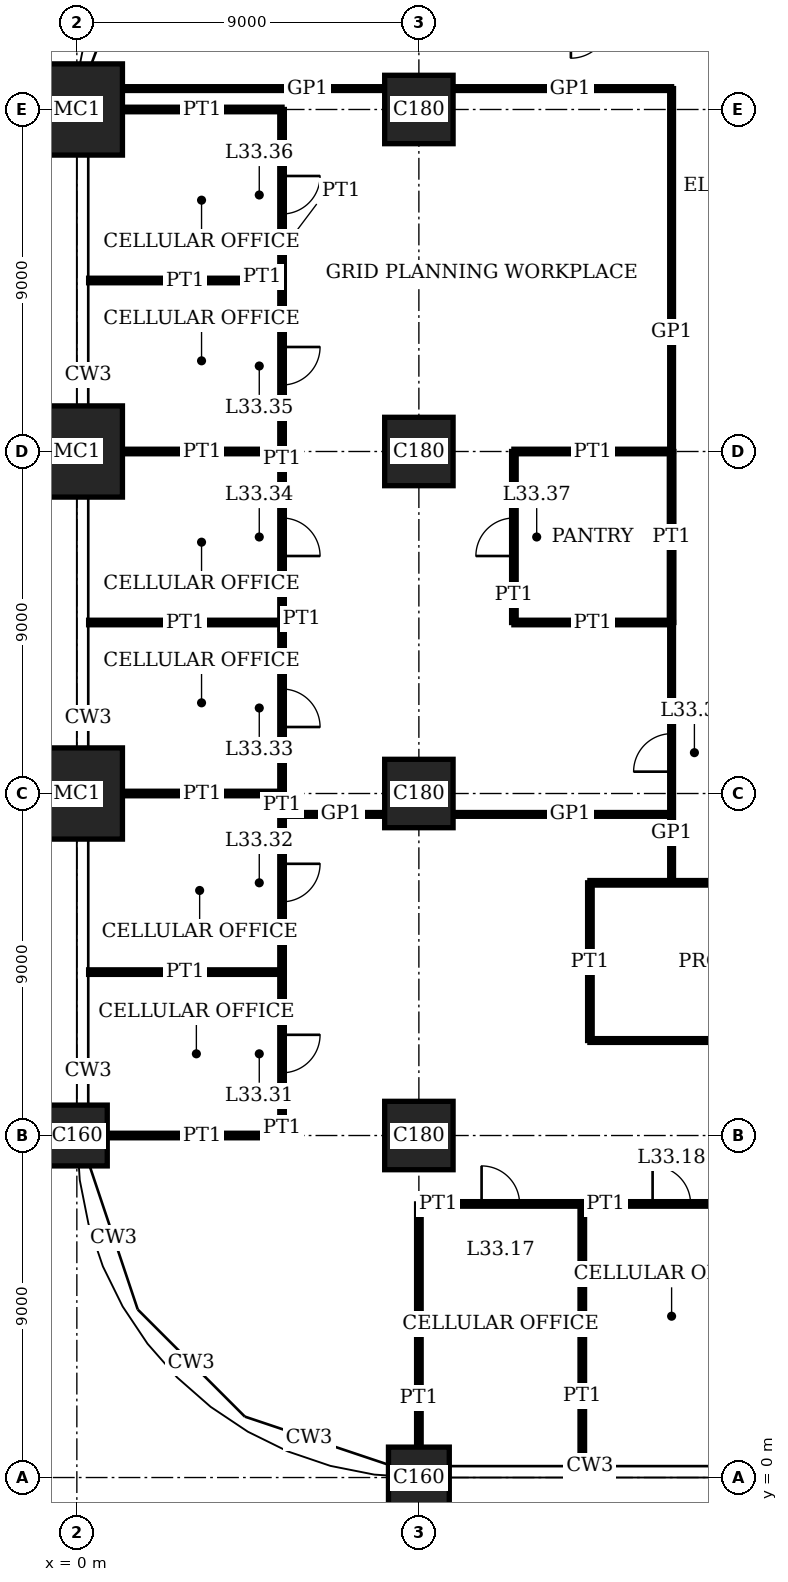
"""IFC4 building model, lengths in metres.
Left out: names, types, materials, properties, quantities, classifications, styles, units other than length and angle.
Written with IfcOpenShell. Run it as: python <this file> out.ifc"""

import sys

from ifc_helpers import new_model, si_unit, direction, frame, frame_2d, origin, origin_2d, place, context, subcontext, project, spatial, rectangle, extrude, element, fill, save


model = new_model("IFC4")
c1 = context("Model", 3, precision=1e-05, world=origin(), true_north=direction((0.0, 1.0)))
c2 = subcontext(c1, "Body", "Model", "MODEL_VIEW")
j1 = project(units=[si_unit("LENGTHUNIT", "METRE"), si_unit("PLANEANGLEUNIT", "RADIAN")], contexts=[c1])
p1 = place(None, origin())
s1 = spatial("IfcSite", under=j1, at=p1, CompositionType="ELEMENT")
p2 = place(p1, origin())
s2 = spatial("IfcBuilding", under=s1, at=p2, CompositionType="ELEMENT")
p3 = place(p2, frame((0.0, 0.0, 137.0)))
s3 = spatial("IfcBuildingStorey", under=s2, at=p3, CompositionType="ELEMENT", Elevation=137.0)
p4 = place(p3, frame((0.0, 9.0, 0.0), z_axis=(0.0, 0.0, 1.0), x_axis=(1.0, 0.0, 0.0)))
e1 = element("IfcColumn", 1, at=p4, inside=s3, PredefinedType="COLUMN", context=c2, shape_type="SweptSolid", body=[
    extrude(rectangle(XDim=1.6, YDim=1.6, at=origin_2d()), origin(), (0.0, 0.0, 1.0), 4.0),
])
for number, where, z_axis, x_axis in (
    (2, (0.0, 18.0, 0.0), (0.0, 0.0, 1.0), (1.0, 0.0, 0.0)),
    (3, (0.0, 27.0, 0.0), (0.0, 0.0, 1.0), (1.0, 0.0, 0.0)),
    (4, (0.0, 36.0, 0.0), (0.0, 0.0, 1.0), (1.0, 0.0, 0.0)),
):
    element("IfcColumn", number, at=place(p3, frame(where, z_axis=z_axis, x_axis=x_axis)), inside=s3, PredefinedType="COLUMN", context=c2, shape_type="SweptSolid", body=[
        extrude(rectangle(XDim=2.4, YDim=2.4, at=origin_2d()), origin(), (0.0, 0.0, 1.0), 4.0),
    ])
p5 = place(p3, frame((9.0, 0.0, 0.0), z_axis=(0.0, 0.0, 1.0), x_axis=(1.0, 0.0, 0.0)))
e5 = element("IfcColumn", 5, at=p5, inside=s3, PredefinedType="COLUMN", context=c2, shape_type="SweptSolid", body=[
    extrude(rectangle(XDim=1.6, YDim=1.6, at=origin_2d()), origin(), (0.0, 0.0, 1.0), 4.0),
])
for number, where, z_axis, x_axis in (
    (6, (9.0, 9.0, 0.0), (0.0, 0.0, 1.0), (1.0, 0.0, 0.0)),
    (7, (9.0, 18.0, 0.0), (0.0, 0.0, 1.0), (1.0, 0.0, 0.0)),
    (8, (9.0, 27.0, 0.0), (0.0, 0.0, 1.0), (1.0, 0.0, 0.0)),
    (9, (9.0, 36.0, 0.0), (0.0, 0.0, 1.0), (1.0, 0.0, 0.0)),
):
    element("IfcColumn", number, at=place(p3, frame(where, z_axis=z_axis, x_axis=x_axis)), inside=s3, PredefinedType="COLUMN", context=c2, shape_type="SweptSolid", body=[
        extrude(rectangle(XDim=1.8, YDim=1.8, at=origin_2d()), origin(), (0.0, 0.0, 1.0), 4.0),
    ])
p6 = place(p3, frame((9.0, 7.2, 0.0), z_axis=(0.0, 0.0, 1.0), x_axis=(1.0, 0.0, 0.0)))
e10 = element("IfcWall", 10, at=p6, inside=s3, PredefinedType="PARTITIONING", context=c2, shape_type="SweptSolid", body=[
    extrude(rectangle(XDim=4.3, YDim=0.12, at=frame_2d((2.15, 0.0))), origin(), (0.0, 0.0, 1.0), 3.75),
])
p7 = place(p6, frame((1.65, 0.0, 0.0)))
e11 = element("IfcOpeningElement", 11, at=p7, cuts=e10, PredefinedType="OPENING", context=c2, shape_type="SweptSolid", body=[
    extrude(rectangle(XDim=1.0, YDim=2.4, at=frame_2d((0.5, 1.2))), frame((0.0, 0.07, 0.0), z_axis=(0.0, -1.0, 0.0), x_axis=(1.0, 0.0, 0.0)), (0.0, 0.0, 1.0), 0.14),
])
p8 = place(p3, frame((13.3, 7.2, 0.0), z_axis=(0.0, 0.0, 1.0), x_axis=(1.0, 0.0, 0.0)))
e12 = element("IfcWall", 12, at=p8, inside=s3, PredefinedType="PARTITIONING", context=c2, shape_type="SweptSolid", body=[
    extrude(rectangle(XDim=4.7, YDim=0.12, at=frame_2d((2.35, 0.0))), origin(), (0.0, 0.0, 1.0), 3.75),
])
p9 = place(p8, frame((1.85, 0.0, 0.0)))
e13 = element("IfcOpeningElement", 13, at=p9, cuts=e12, PredefinedType="OPENING", context=c2, shape_type="SweptSolid", body=[
    extrude(rectangle(XDim=1.0, YDim=2.4, at=frame_2d((0.5, 1.2))), frame((0.0, 0.07, 0.0), z_axis=(0.0, -1.0, 0.0), x_axis=(1.0, 0.0, 0.0)), (0.0, 0.0, 1.0), 0.14),
])
p10 = place(p3, frame((0.8, 9.0, 0.0), z_axis=(0.0, 0.0, 1.0), x_axis=(1.0, 0.0, 0.0)))
e14 = element("IfcWall", 14, at=p10, inside=s3, PredefinedType="PARTITIONING", context=c2, shape_type="SweptSolid", body=[
    extrude(rectangle(XDim=4.6, YDim=0.12, at=frame_2d((2.3, 0.0))), origin(), (0.0, 0.0, 1.0), 3.05),
])
p11 = place(p3, frame((13.5, 11.5, 0.0), z_axis=(0.0, 0.0, 1.0), x_axis=(1.0, 0.0, 0.0)))
e15 = element("IfcWall", 15, at=p11, inside=s3, PredefinedType="PARTITIONING", context=c2, shape_type="SweptSolid", body=[
    extrude(rectangle(XDim=9.0, YDim=0.1, at=frame_2d((4.5, 0.0))), origin(), (0.0, 0.0, 1.0), 3.75),
])
p12 = place(p11, frame((4.0, 0.0, 0.0)))
e16 = element("IfcOpeningElement", 16, at=p12, cuts=e15, PredefinedType="OPENING", context=c2, shape_type="SweptSolid", body=[
    extrude(rectangle(XDim=1.0, YDim=2.4, at=frame_2d((0.5, 1.2))), frame((0.0, 0.06, 0.0), z_axis=(0.0, -1.0, 0.0), x_axis=(1.0, 0.0, 0.0)), (0.0, 0.0, 1.0), 0.12),
])
p13 = place(p3, frame((0.31, 13.3, 0.0), z_axis=(0.0, 0.0, 1.0), x_axis=(1.0, 0.0, 0.0)))
e17 = element("IfcWall", 17, at=p13, inside=s3, PredefinedType="PARTITIONING", context=c2, shape_type="SweptSolid", body=[
    extrude(rectangle(XDim=5.09, YDim=0.12, at=frame_2d((2.545, 0.0))), origin(), (0.0, 0.0, 1.0), 3.1),
])
p14 = place(p3, frame((13.5, 15.65, 0.0), z_axis=(0.0, 0.0, 1.0), x_axis=(1.0, 0.0, 0.0)))
e18 = element("IfcWall", 18, at=p14, inside=s3, PredefinedType="PARTITIONING", context=c2, shape_type="SweptSolid", body=[
    extrude(rectangle(XDim=9.0, YDim=0.12, at=frame_2d((4.5, 0.0))), origin(), (0.0, 0.0, 1.0), 3.75),
])
p15 = place(p3, frame((5.39, 17.45, 0.0), z_axis=(0.0, 0.0, 1.0), x_axis=(1.0, 0.0, 0.0)))
e19 = element("IfcWall", 19, at=p15, inside=s3, PredefinedType="PARTITIONING", context=c2, shape_type="SweptSolid", body=[
    extrude(rectangle(XDim=2.71, YDim=0.1, at=frame_2d((1.355, 0.0))), origin(), (0.0, 0.0, 1.0), 3.75),
])
p16 = place(p3, frame((9.9, 17.45, 0.0), z_axis=(0.0, 0.0, 1.0), x_axis=(1.0, 0.0, 0.0)))
e20 = element("IfcWall", 20, at=p16, inside=s3, PredefinedType="PARTITIONING", context=c2, shape_type="SweptSolid", body=[
    extrude(rectangle(XDim=5.75, YDim=0.1, at=frame_2d((2.875, 0.0))), origin(), (0.0, 0.0, 1.0), 3.75),
])
p17 = place(p3, frame((1.2, 18.0, 0.0), z_axis=(0.0, 0.0, 1.0), x_axis=(1.0, 0.0, 0.0)))
e21 = element("IfcWall", 21, at=p17, inside=s3, PredefinedType="PARTITIONING", context=c2, shape_type="SweptSolid", body=[
    extrude(rectangle(XDim=4.2, YDim=0.12, at=frame_2d((2.1, 0.0))), origin(), (0.0, 0.0, 1.0), 3.05),
])
p18 = place(p3, frame((0.31, 22.5, 0.0), z_axis=(0.0, 0.0, 1.0), x_axis=(1.0, 0.0, 0.0)))
e22 = element("IfcWall", 22, at=p18, inside=s3, PredefinedType="PARTITIONING", context=c2, shape_type="SweptSolid", body=[
    extrude(rectangle(XDim=5.09, YDim=0.12, at=frame_2d((2.545, 0.0))), origin(), (0.0, 0.0, 1.0), 3.1),
])
p19 = place(p3, frame((11.5, 22.5, 0.0), z_axis=(0.0, 0.0, 1.0), x_axis=(1.0, 0.0, 0.0)))
e23 = element("IfcWall", 23, at=p19, inside=s3, PredefinedType="PARTITIONING", context=c2, shape_type="SweptSolid", body=[
    extrude(rectangle(XDim=4.15, YDim=0.12, at=frame_2d((2.075, 0.0))), origin(), (0.0, 0.0, 1.0), 3.1),
])
p20 = place(p3, frame((1.2, 27.0, 0.0), z_axis=(0.0, 0.0, 1.0), x_axis=(1.0, 0.0, 0.0)))
e24 = element("IfcWall", 24, at=p20, inside=s3, PredefinedType="PARTITIONING", context=c2, shape_type="SweptSolid", body=[
    extrude(rectangle(XDim=4.2, YDim=0.12, at=frame_2d((2.1, 0.0))), origin(), (0.0, 0.0, 1.0), 3.05),
])
p21 = place(p3, frame((11.5, 27.0, 0.0), z_axis=(0.0, 0.0, 1.0), x_axis=(1.0, 0.0, 0.0)))
e25 = element("IfcWall", 25, at=p21, inside=s3, PredefinedType="PARTITIONING", context=c2, shape_type="SweptSolid", body=[
    extrude(rectangle(XDim=4.15, YDim=0.12, at=frame_2d((2.075, 0.0))), origin(), (0.0, 0.0, 1.0), 3.05),
])
p22 = place(p3, frame((0.31, 31.5, 0.0), z_axis=(0.0, 0.0, 1.0), x_axis=(1.0, 0.0, 0.0)))
e26 = element("IfcWall", 26, at=p22, inside=s3, PredefinedType="PARTITIONING", context=c2, shape_type="SweptSolid", body=[
    extrude(rectangle(XDim=5.09, YDim=0.12, at=frame_2d((2.545, 0.0))), origin(), (0.0, 0.0, 1.0), 3.1),
])
p23 = place(p3, frame((1.2, 36.0, 0.0), z_axis=(0.0, 0.0, 1.0), x_axis=(1.0, 0.0, 0.0)))
e27 = element("IfcWall", 27, at=p23, inside=s3, PredefinedType="PARTITIONING", context=c2, shape_type="SweptSolid", body=[
    extrude(rectangle(XDim=4.2, YDim=0.12, at=frame_2d((2.1, 0.0))), origin(), (0.0, 0.0, 1.0), 3.05),
])
p24 = place(p3, frame((1.2, 36.55, 0.0), z_axis=(0.0, 0.0, 1.0), x_axis=(1.0, 0.0, 0.0)))
e28 = element("IfcWall", 28, at=p24, inside=s3, PredefinedType="PARTITIONING", context=c2, shape_type="SweptSolid", body=[
    extrude(rectangle(XDim=6.9, YDim=0.1, at=frame_2d((3.45, 0.0))), origin(), (0.0, 0.0, 1.0), 3.75),
])
p25 = place(p3, frame((9.9, 36.55, 0.0), z_axis=(0.0, 0.0, 1.0), x_axis=(1.0, 0.0, 0.0)))
e29 = element("IfcWall", 29, at=p25, inside=s3, PredefinedType="PARTITIONING", context=c2, shape_type="SweptSolid", body=[
    extrude(rectangle(XDim=5.75, YDim=0.1, at=frame_2d((2.875, 0.0))), origin(), (0.0, 0.0, 1.0), 3.75),
])
p26 = place(p3, frame((5.4, 9.0, 0.0), z_axis=(0.0, 0.0, 1.0), x_axis=(0.0, 1.0, 0.0)))
e30 = element("IfcWall", 30, at=p26, inside=s3, PredefinedType="PARTITIONING", context=c2, shape_type="SweptSolid", body=[
    extrude(rectangle(XDim=4.3, YDim=0.12, at=frame_2d((2.15, 0.0))), origin(), (0.0, 0.0, 1.0), 3.75),
])
p27 = place(p26, frame((1.65, 0.0, 0.0)))
e31 = element("IfcOpeningElement", 31, at=p27, cuts=e30, PredefinedType="OPENING", context=c2, shape_type="SweptSolid", body=[
    extrude(rectangle(XDim=1.0, YDim=2.4, at=frame_2d((0.5, 1.2))), frame((0.0, 0.07, 0.0), z_axis=(0.0, -1.0, 0.0), x_axis=(1.0, 0.0, 0.0)), (0.0, 0.0, 1.0), 0.14),
])
p28 = place(p3, frame((5.4, 13.3, 0.0), z_axis=(0.0, 0.0, 1.0), x_axis=(0.0, 1.0, 0.0)))
e32 = element("IfcWall", 32, at=p28, inside=s3, PredefinedType="PARTITIONING", context=c2, shape_type="SweptSolid", body=[
    extrude(rectangle(XDim=4.7, YDim=0.12, at=frame_2d((2.35, 0.0))), origin(), (0.0, 0.0, 1.0), 3.75),
])
p29 = place(p28, frame((1.85, 0.0, 0.0)))
e33 = element("IfcOpeningElement", 33, at=p29, cuts=e32, PredefinedType="OPENING", context=c2, shape_type="SweptSolid", body=[
    extrude(rectangle(XDim=1.0, YDim=2.4, at=frame_2d((0.5, 1.2))), frame((0.0, 0.07, 0.0), z_axis=(0.0, -1.0, 0.0), x_axis=(1.0, 0.0, 0.0)), (0.0, 0.0, 1.0), 0.14),
])
p30 = place(p3, frame((5.4, 18.0, 0.0), z_axis=(0.0, 0.0, 1.0), x_axis=(0.0, 1.0, 0.0)))
e34 = element("IfcWall", 34, at=p30, inside=s3, PredefinedType="PARTITIONING", context=c2, shape_type="SweptSolid", body=[
    extrude(rectangle(XDim=4.5, YDim=0.12, at=frame_2d((2.25, 0.0))), origin(), (0.0, 0.0, 1.0), 3.75),
])
p31 = place(p30, frame((1.75, 0.0, 0.0)))
e35 = element("IfcOpeningElement", 35, at=p31, cuts=e34, PredefinedType="OPENING", context=c2, shape_type="SweptSolid", body=[
    extrude(rectangle(XDim=1.0, YDim=2.4, at=frame_2d((0.5, 1.2))), frame((0.0, 0.07, 0.0), z_axis=(0.0, -1.0, 0.0), x_axis=(1.0, 0.0, 0.0)), (0.0, 0.0, 1.0), 0.14),
])
p32 = place(p3, frame((5.4, 22.5, 0.0), z_axis=(0.0, 0.0, 1.0), x_axis=(0.0, 1.0, 0.0)))
e36 = element("IfcWall", 36, at=p32, inside=s3, PredefinedType="PARTITIONING", context=c2, shape_type="SweptSolid", body=[
    extrude(rectangle(XDim=4.5, YDim=0.12, at=frame_2d((2.25, 0.0))), origin(), (0.0, 0.0, 1.0), 3.75),
])
p33 = place(p32, frame((1.75, 0.0, 0.0)))
e37 = element("IfcOpeningElement", 37, at=p33, cuts=e36, PredefinedType="OPENING", context=c2, shape_type="SweptSolid", body=[
    extrude(rectangle(XDim=1.0, YDim=2.4, at=frame_2d((0.5, 1.2))), frame((0.0, 0.07, 0.0), z_axis=(0.0, -1.0, 0.0), x_axis=(1.0, 0.0, 0.0)), (0.0, 0.0, 1.0), 0.14),
])
p34 = place(p3, frame((5.4, 27.0, 0.0), z_axis=(0.0, 0.0, 1.0), x_axis=(0.0, 1.0, 0.0)))
e38 = element("IfcWall", 38, at=p34, inside=s3, PredefinedType="PARTITIONING", context=c2, shape_type="SweptSolid", body=[
    extrude(rectangle(XDim=4.5, YDim=0.12, at=frame_2d((2.25, 0.0))), origin(), (0.0, 0.0, 1.0), 3.75),
])
p35 = place(p34, frame((1.75, 0.0, 0.0)))
e39 = element("IfcOpeningElement", 39, at=p35, cuts=e38, PredefinedType="OPENING", context=c2, shape_type="SweptSolid", body=[
    extrude(rectangle(XDim=1.0, YDim=2.4, at=frame_2d((0.5, 1.2))), frame((0.0, 0.07, 0.0), z_axis=(0.0, -1.0, 0.0), x_axis=(1.0, 0.0, 0.0)), (0.0, 0.0, 1.0), 0.14),
])
p36 = place(p3, frame((5.4, 31.5, 0.0), z_axis=(0.0, 0.0, 1.0), x_axis=(0.0, 1.0, 0.0)))
e40 = element("IfcWall", 40, at=p36, inside=s3, PredefinedType="PARTITIONING", context=c2, shape_type="SweptSolid", body=[
    extrude(rectangle(XDim=4.5, YDim=0.12, at=frame_2d((2.25, 0.0))), origin(), (0.0, 0.0, 1.0), 3.75),
])
p37 = place(p36, frame((1.75, 0.0, 0.0)))
e41 = element("IfcOpeningElement", 41, at=p37, cuts=e40, PredefinedType="OPENING", context=c2, shape_type="SweptSolid", body=[
    extrude(rectangle(XDim=1.0, YDim=2.4, at=frame_2d((0.5, 1.2))), frame((0.0, 0.07, 0.0), z_axis=(0.0, -1.0, 0.0), x_axis=(1.0, 0.0, 0.0)), (0.0, 0.0, 1.0), 0.14),
])
p38 = place(p3, frame((9.0, 0.8, 0.0), z_axis=(0.0, 0.0, 1.0), x_axis=(0.0, 1.0, 0.0)))
e42 = element("IfcWall", 42, at=p38, inside=s3, PredefinedType="PARTITIONING", context=c2, shape_type="SweptSolid", body=[
    extrude(rectangle(XDim=6.4, YDim=0.12, at=frame_2d((3.2, 0.0))), origin(), (0.0, 0.0, 1.0), 3.05),
])
p39 = place(p3, frame((11.5, 22.5, 0.0), z_axis=(0.0, 0.0, 1.0), x_axis=(0.0, 1.0, 0.0)))
e43 = element("IfcWall", 43, at=p39, inside=s3, PredefinedType="PARTITIONING", context=c2, shape_type="SweptSolid", body=[
    extrude(rectangle(XDim=4.5, YDim=0.12, at=frame_2d((2.25, 0.0))), origin(), (0.0, 0.0, 1.0), 3.75),
])
p40 = place(p39, frame((1.75, 0.0, 0.0)))
e44 = element("IfcOpeningElement", 44, at=p40, cuts=e43, PredefinedType="OPENING", context=c2, shape_type="SweptSolid", body=[
    extrude(rectangle(XDim=1.0, YDim=2.4, at=frame_2d((0.5, 1.2))), frame((0.0, 0.07, 0.0), z_axis=(0.0, -1.0, 0.0), x_axis=(1.0, 0.0, 0.0)), (0.0, 0.0, 1.0), 0.14),
])
p41 = place(p3, frame((13.3, 0.31, 0.0), z_axis=(0.0, 0.0, 1.0), x_axis=(0.0, 1.0, 0.0)))
e45 = element("IfcWall", 45, at=p41, inside=s3, PredefinedType="PARTITIONING", context=c2, shape_type="SweptSolid", body=[
    extrude(rectangle(XDim=6.89, YDim=0.12, at=frame_2d((3.445, 0.0))), origin(), (0.0, 0.0, 1.0), 3.75),
])
p42 = place(p3, frame((13.5, 11.5, 0.0), z_axis=(0.0, 0.0, 1.0), x_axis=(0.0, 1.0, 0.0)))
e46 = element("IfcWall", 46, at=p42, inside=s3, PredefinedType="PARTITIONING", context=c2, shape_type="SweptSolid", body=[
    extrude(rectangle(XDim=4.15, YDim=0.12, at=frame_2d((2.075, 0.0))), origin(), (0.0, 0.0, 1.0), 3.75),
])
p43 = place(p3, frame((15.65, 22.5, 0.0), z_axis=(0.0, 0.0, 1.0), x_axis=(0.0, 1.0, 0.0)))
e47 = element("IfcWall", 47, at=p43, inside=s3, PredefinedType="PARTITIONING", context=c2, shape_type="SweptSolid", body=[
    extrude(rectangle(XDim=4.5, YDim=0.12, at=frame_2d((2.25, 0.0))), origin(), (0.0, 0.0, 1.0), 3.75),
])
p44 = place(p3, frame((15.65, 15.65, 0.0), z_axis=(0.0, 0.0, 1.0), x_axis=(0.0, 1.0, 0.0)))
e48 = element("IfcWall", 48, at=p44, inside=s3, PredefinedType="PARTITIONING", context=c2, shape_type="SweptSolid", body=[
    extrude(rectangle(XDim=6.85, YDim=0.1, at=frame_2d((3.425, 0.0))), origin(), (0.0, 0.0, 1.0), 3.75),
])
p45 = place(p44, frame((2.925, 0.0, 0.0)))
e49 = element("IfcOpeningElement", 49, at=p45, cuts=e48, PredefinedType="OPENING", context=c2, shape_type="SweptSolid", body=[
    extrude(rectangle(XDim=1.0, YDim=2.4, at=frame_2d((0.5, 1.2))), frame((0.0, 0.06, 0.0), z_axis=(0.0, -1.0, 0.0), x_axis=(1.0, 0.0, 0.0)), (0.0, 0.0, 1.0), 0.12),
])
p46 = place(p3, frame((15.65, 27.0, 0.0), z_axis=(0.0, 0.0, 1.0), x_axis=(0.0, 1.0, 0.0)))
e50 = element("IfcWall", 50, at=p46, inside=s3, PredefinedType="PARTITIONING", context=c2, shape_type="SweptSolid", body=[
    extrude(rectangle(XDim=9.55, YDim=0.1, at=frame_2d((4.775, 0.0))), origin(), (0.0, 0.0, 1.0), 3.75),
])
p47 = place(p7, origin())
e51 = element("IfcDoor", 51, at=p47, inside=s3, OperationType="SINGLE_SWING_RIGHT", PredefinedType="DOOR", context=c2, shape_type="SweptSolid", body=[
    extrude(rectangle(XDim=1.0, YDim=2.4, at=frame_2d((0.5, 1.2))), frame((0.0, 0.025, 0.0), z_axis=(0.0, -1.0, 0.0), x_axis=(1.0, 0.0, 0.0)), (0.0, 0.0, 1.0), 0.05),
])
fill(e11, e51)
p48 = place(p9, origin())
e52 = element("IfcDoor", 52, at=p48, inside=s3, OperationType="SINGLE_SWING_RIGHT", PredefinedType="DOOR", context=c2, shape_type="SweptSolid", body=[
    extrude(rectangle(XDim=1.0, YDim=2.4, at=frame_2d((0.5, 1.2))), frame((0.0, 0.025, 0.0), z_axis=(0.0, -1.0, 0.0), x_axis=(1.0, 0.0, 0.0)), (0.0, 0.0, 1.0), 0.05),
])
fill(e13, e52)
p49 = place(p27, origin())
e53 = element("IfcDoor", 53, at=p49, inside=s3, OperationType="SINGLE_SWING_RIGHT", PredefinedType="DOOR", context=c2, shape_type="SweptSolid", body=[
    extrude(rectangle(XDim=1.0, YDim=2.4, at=frame_2d((0.5, 1.2))), frame((0.0, 0.025, 0.0), z_axis=(0.0, -1.0, 0.0), x_axis=(1.0, 0.0, 0.0)), (0.0, 0.0, 1.0), 0.05),
])
fill(e31, e53)
p50 = place(p29, origin())
e54 = element("IfcDoor", 54, at=p50, inside=s3, OperationType="SINGLE_SWING_RIGHT", PredefinedType="DOOR", context=c2, shape_type="SweptSolid", body=[
    extrude(rectangle(XDim=1.0, YDim=2.4, at=frame_2d((0.5, 1.2))), frame((0.0, 0.025, 0.0), z_axis=(0.0, -1.0, 0.0), x_axis=(1.0, 0.0, 0.0)), (0.0, 0.0, 1.0), 0.05),
])
fill(e33, e54)
p51 = place(p31, origin())
e55 = element("IfcDoor", 55, at=p51, inside=s3, OperationType="SINGLE_SWING_LEFT", PredefinedType="DOOR", context=c2, shape_type="SweptSolid", body=[
    extrude(rectangle(XDim=1.0, YDim=2.4, at=frame_2d((0.5, 1.2))), frame((0.0, 0.025, 0.0), z_axis=(0.0, -1.0, 0.0), x_axis=(1.0, 0.0, 0.0)), (0.0, 0.0, 1.0), 0.05),
])
fill(e35, e55)
p52 = place(p33, origin())
e56 = element("IfcDoor", 56, at=p52, inside=s3, OperationType="SINGLE_SWING_LEFT", PredefinedType="DOOR", context=c2, shape_type="SweptSolid", body=[
    extrude(rectangle(XDim=1.0, YDim=2.4, at=frame_2d((0.5, 1.2))), frame((0.0, 0.025, 0.0), z_axis=(0.0, -1.0, 0.0), x_axis=(1.0, 0.0, 0.0)), (0.0, 0.0, 1.0), 0.05),
])
fill(e37, e56)
p53 = place(p35, origin())
e57 = element("IfcDoor", 57, at=p53, inside=s3, OperationType="SINGLE_SWING_RIGHT", PredefinedType="DOOR", context=c2, shape_type="SweptSolid", body=[
    extrude(rectangle(XDim=1.0, YDim=2.4, at=frame_2d((0.5, 1.2))), frame((0.0, 0.025, 0.0), z_axis=(0.0, -1.0, 0.0), x_axis=(1.0, 0.0, 0.0)), (0.0, 0.0, 1.0), 0.05),
])
fill(e39, e57)
p54 = place(p37, origin())
e58 = element("IfcDoor", 58, at=p54, inside=s3, OperationType="SINGLE_SWING_RIGHT", PredefinedType="DOOR", context=c2, shape_type="SweptSolid", body=[
    extrude(rectangle(XDim=1.0, YDim=2.4, at=frame_2d((0.5, 1.2))), frame((0.0, 0.025, 0.0), z_axis=(0.0, -1.0, 0.0), x_axis=(1.0, 0.0, 0.0)), (0.0, 0.0, 1.0), 0.05),
])
fill(e41, e58)
p55 = place(p40, origin())
e59 = element("IfcDoor", 59, at=p55, inside=s3, OperationType="SINGLE_SWING_RIGHT", PredefinedType="DOOR", context=c2, shape_type="SweptSolid", body=[
    extrude(rectangle(XDim=1.0, YDim=2.4, at=frame_2d((0.5, 1.2))), frame((0.0, 0.025, 0.0), z_axis=(0.0, -1.0, 0.0), x_axis=(1.0, 0.0, 0.0)), (0.0, 0.0, 1.0), 0.05),
])
fill(e44, e59)
p56 = place(p45, origin())
e60 = element("IfcDoor", 60, at=p56, inside=s3, OperationType="SINGLE_SWING_RIGHT", PredefinedType="DOOR", context=c2, shape_type="SweptSolid", body=[
    extrude(rectangle(XDim=1.0, YDim=2.4, at=frame_2d((0.5, 1.2))), frame((0.0, 0.02, 0.0), z_axis=(0.0, -1.0, 0.0), x_axis=(1.0, 0.0, 0.0)), (0.0, 0.0, 1.0), 0.04),
])
fill(e49, e60)
save(model, sys.argv[1])
